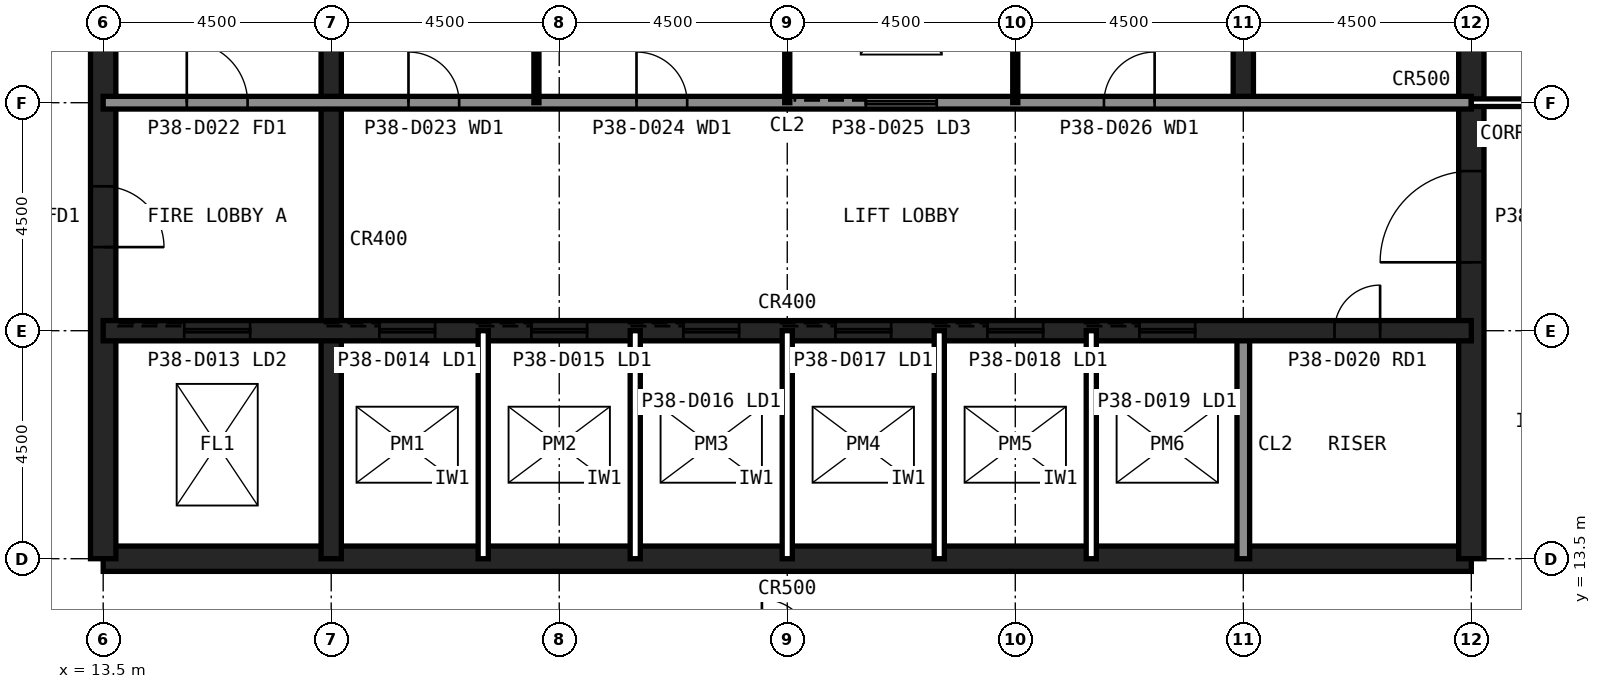
"""IFC4 building model, lengths in metres.
Left out: names, types, materials, properties, quantities, classifications, styles, units other than length and angle.
Written with IfcOpenShell. Run it as: python <this file> out.ifc"""

import sys

from ifc_helpers import new_model, si_unit, direction, frame, frame_2d, origin, place, context, subcontext, project, spatial, rectangle, extrude, element, fill, save


model = new_model("IFC4")
c1 = context("Model", 3, precision=1e-05, world=origin(), true_north=direction((0.0, 1.0)))
c2 = subcontext(c1, "Body", "Model", "MODEL_VIEW")
j1 = project(units=[si_unit("LENGTHUNIT", "METRE"), si_unit("PLANEANGLEUNIT", "RADIAN")], contexts=[c1])
p1 = place(None, origin())
s1 = spatial("IfcSite", under=j1, at=p1, CompositionType="ELEMENT")
p2 = place(p1, origin())
s2 = spatial("IfcBuilding", under=s1, at=p2, CompositionType="ELEMENT")
p3 = place(p2, frame((0.0, 0.0, 159.6)))
s3 = spatial("IfcBuildingStorey", under=s2, at=p3, CompositionType="ELEMENT", Elevation=159.6)
p4 = place(p3, frame((13.5, 13.5, 0.0), z_axis=(0.0, 0.0, 1.0), x_axis=(1.0, 0.0, 0.0)))
e1 = element("IfcWall", 1, at=p4, inside=s3, PredefinedType="SHEAR", context=c2, shape_type="SweptSolid", body=[
    extrude(rectangle(XDim=27.0, YDim=0.5, at=frame_2d((13.5, 0.0))), origin(), (0.0, 0.0, 1.0), 4.0),
])
p5 = place(p3, frame((40.5, 13.5, 0.0), z_axis=(0.0, 0.0, 1.0), x_axis=(0.0, 1.0, 0.0)))
e2 = element("IfcWall", 2, at=p5, inside=s3, PredefinedType="SHEAR", context=c2, shape_type="SweptSolid", body=[
    extrude(rectangle(XDim=27.0, YDim=0.5, at=frame_2d((13.5, 0.0))), origin(), (0.0, 0.0, 1.0), 4.0),
])
p6 = place(p5, frame((5.85, 0.0, 0.0)))
e3 = element("IfcOpeningElement", 3, at=p6, cuts=e2, PredefinedType="OPENING", context=c2, shape_type="SweptSolid", body=[
    extrude(rectangle(XDim=1.8, YDim=2.1, at=frame_2d((0.9, 1.05))), frame((0.0, 0.26, 0.0), z_axis=(0.0, -1.0, 0.0), x_axis=(1.0, 0.0, 0.0)), (0.0, 0.0, 1.0), 0.52),
])
p7 = place(p5, frame((19.65, 0.0, 0.0)))
e4 = element("IfcOpeningElement", 4, at=p7, cuts=e2, PredefinedType="OPENING", context=c2, shape_type="SweptSolid", body=[
    extrude(rectangle(XDim=1.2, YDim=2.1, at=frame_2d((0.6, 1.05))), frame((0.0, 0.26, 0.0), z_axis=(0.0, -1.0, 0.0), x_axis=(1.0, 0.0, 0.0)), (0.0, 0.0, 1.0), 0.52),
])
p8 = place(p3, frame((13.5, 40.5, 0.0), z_axis=(0.0, 0.0, 1.0), x_axis=(0.0, -1.0, 0.0)))
e5 = element("IfcWall", 5, at=p8, inside=s3, PredefinedType="SHEAR", context=c2, shape_type="SweptSolid", body=[
    extrude(rectangle(XDim=27.0, YDim=0.5, at=frame_2d((13.5, 0.0))), origin(), (0.0, 0.0, 1.0), 4.0),
])
p9 = place(p8, frame((19.65, 0.0, 0.0)))
e6 = element("IfcOpeningElement", 6, at=p9, cuts=e5, PredefinedType="OPENING", context=c2, shape_type="SweptSolid", body=[
    extrude(rectangle(XDim=1.2, YDim=2.1, at=frame_2d((0.6, 1.05))), frame((0.0, 0.26, 0.0), z_axis=(0.0, -1.0, 0.0), x_axis=(1.0, 0.0, 0.0)), (0.0, 0.0, 1.0), 0.52),
])
p10 = place(p8, frame((5.85, 0.0, 0.0)))
e7 = element("IfcOpeningElement", 7, at=p10, cuts=e5, PredefinedType="OPENING", context=c2, shape_type="SweptSolid", body=[
    extrude(rectangle(XDim=1.8, YDim=2.1, at=frame_2d((0.9, 1.05))), frame((0.0, 0.26, 0.0), z_axis=(0.0, -1.0, 0.0), x_axis=(1.0, 0.0, 0.0)), (0.0, 0.0, 1.0), 0.52),
])
p11 = place(p3, frame((18.0, 13.5, 0.0), z_axis=(0.0, 0.0, 1.0), x_axis=(0.0, 1.0, 0.0)))
e8 = element("IfcWall", 8, at=p11, inside=s3, PredefinedType="SHEAR", context=c2, shape_type="SweptSolid", body=[
    extrude(rectangle(XDim=18.0, YDim=0.4, at=frame_2d((9.0, 0.0))), origin(), (0.0, 0.0, 1.0), 4.0),
])
p12 = place(p3, frame((36.0, 13.5, 0.0), z_axis=(0.0, 0.0, 1.0), x_axis=(0.0, 1.0, 0.0)))
e9 = element("IfcWall", 9, at=p12, inside=s3, PredefinedType="SOLIDWALL", context=c2, shape_type="SweptSolid", body=[
    extrude(rectangle(XDim=4.5, YDim=0.25, at=frame_2d((2.25, 0.0))), origin(), (0.0, 0.0, 1.0), 3.84),
])
p13 = place(p3, frame((36.0, 22.5, 0.0), z_axis=(0.0, 0.0, 1.0), x_axis=(0.0, 1.0, 0.0)))
e10 = element("IfcWall", 10, at=p13, inside=s3, PredefinedType="SHEAR", context=c2, shape_type="SweptSolid", body=[
    extrude(rectangle(XDim=18.0, YDim=0.4, at=frame_2d((9.0, 0.0))), origin(), (0.0, 0.0, 1.0), 4.0),
])
p14 = place(p3, frame((13.5, 18.0, 0.0), z_axis=(0.0, 0.0, 1.0), x_axis=(1.0, 0.0, 0.0)))
e11 = element("IfcWall", 11, at=p14, inside=s3, PredefinedType="SHEAR", context=c2, shape_type="SweptSolid", body=[
    extrude(rectangle(XDim=27.0, YDim=0.4, at=frame_2d((13.5, 0.0))), origin(), (0.0, 0.0, 1.0), 4.0),
])
p15 = place(p14, frame((24.3, 0.0, 0.0)))
e12 = element("IfcOpeningElement", 12, at=p15, cuts=e11, PredefinedType="OPENING", context=c2, shape_type="SweptSolid", body=[
    extrude(rectangle(XDim=0.9, YDim=2.1, at=frame_2d((0.45, 1.05))), frame((0.0, 0.21, 0.0), z_axis=(0.0, -1.0, 0.0), x_axis=(1.0, 0.0, 0.0)), (0.0, 0.0, 1.0), 0.42),
])
p16 = place(p14, frame((5.45, 0.0, 0.0)))
e13 = element("IfcOpeningElement", 13, at=p16, cuts=e11, PredefinedType="OPENING", context=c2, shape_type="SweptSolid", body=[
    extrude(rectangle(XDim=1.1, YDim=2.1, at=frame_2d((0.55, 1.05))), frame((0.0, 0.21, 0.0), z_axis=(0.0, -1.0, 0.0), x_axis=(1.0, 0.0, 0.0)), (0.0, 0.0, 1.0), 0.42),
])
p17 = place(p14, frame((8.45, 0.0, 0.0)))
e14 = element("IfcOpeningElement", 14, at=p17, cuts=e11, PredefinedType="OPENING", context=c2, shape_type="SweptSolid", body=[
    extrude(rectangle(XDim=1.1, YDim=2.1, at=frame_2d((0.55, 1.05))), frame((0.0, 0.21, 0.0), z_axis=(0.0, -1.0, 0.0), x_axis=(1.0, 0.0, 0.0)), (0.0, 0.0, 1.0), 0.42),
])
p18 = place(p14, frame((11.45, 0.0, 0.0)))
e15 = element("IfcOpeningElement", 15, at=p18, cuts=e11, PredefinedType="OPENING", context=c2, shape_type="SweptSolid", body=[
    extrude(rectangle(XDim=1.1, YDim=2.1, at=frame_2d((0.55, 1.05))), frame((0.0, 0.21, 0.0), z_axis=(0.0, -1.0, 0.0), x_axis=(1.0, 0.0, 0.0)), (0.0, 0.0, 1.0), 0.42),
])
p19 = place(p14, frame((14.45, 0.0, 0.0)))
e16 = element("IfcOpeningElement", 16, at=p19, cuts=e11, PredefinedType="OPENING", context=c2, shape_type="SweptSolid", body=[
    extrude(rectangle(XDim=1.1, YDim=2.1, at=frame_2d((0.55, 1.05))), frame((0.0, 0.21, 0.0), z_axis=(0.0, -1.0, 0.0), x_axis=(1.0, 0.0, 0.0)), (0.0, 0.0, 1.0), 0.42),
])
p20 = place(p14, frame((17.45, 0.0, 0.0)))
e17 = element("IfcOpeningElement", 17, at=p20, cuts=e11, PredefinedType="OPENING", context=c2, shape_type="SweptSolid", body=[
    extrude(rectangle(XDim=1.1, YDim=2.1, at=frame_2d((0.55, 1.05))), frame((0.0, 0.21, 0.0), z_axis=(0.0, -1.0, 0.0), x_axis=(1.0, 0.0, 0.0)), (0.0, 0.0, 1.0), 0.42),
])
p21 = place(p14, frame((20.45, 0.0, 0.0)))
e18 = element("IfcOpeningElement", 18, at=p21, cuts=e11, PredefinedType="OPENING", context=c2, shape_type="SweptSolid", body=[
    extrude(rectangle(XDim=1.1, YDim=2.1, at=frame_2d((0.55, 1.05))), frame((0.0, 0.21, 0.0), z_axis=(0.0, -1.0, 0.0), x_axis=(1.0, 0.0, 0.0)), (0.0, 0.0, 1.0), 0.42),
])
p22 = place(p14, frame((1.6, 0.0, 0.0)))
e19 = element("IfcOpeningElement", 19, at=p22, cuts=e11, PredefinedType="OPENING", context=c2, shape_type="SweptSolid", body=[
    extrude(rectangle(XDim=1.3, YDim=2.2, at=frame_2d((0.65, 1.1))), frame((0.0, 0.21, 0.0), z_axis=(0.0, -1.0, 0.0), x_axis=(1.0, 0.0, 0.0)), (0.0, 0.0, 1.0), 0.42),
])
p23 = place(p3, frame((13.5, 22.5, 0.0), z_axis=(0.0, 0.0, 1.0), x_axis=(1.0, 0.0, 0.0)))
e20 = element("IfcWall", 20, at=p23, inside=s3, PredefinedType="SOLIDWALL", context=c2, shape_type="SweptSolid", body=[
    extrude(rectangle(XDim=27.0, YDim=0.25, at=frame_2d((13.5, 0.0))), origin(), (0.0, 0.0, 1.0), 3.84),
])
p24 = place(p23, frame((1.65, 0.0, 0.0)))
e21 = element("IfcOpeningElement", 21, at=p24, cuts=e20, PredefinedType="OPENING", context=c2, shape_type="SweptSolid", body=[
    extrude(rectangle(XDim=1.2, YDim=2.1, at=frame_2d((0.6, 1.05))), frame((0.0, 0.135, 0.0), z_axis=(0.0, -1.0, 0.0), x_axis=(1.0, 0.0, 0.0)), (0.0, 0.0, 1.0), 0.27),
])
p25 = place(p23, frame((6.025, 0.0, 0.0)))
e22 = element("IfcOpeningElement", 22, at=p25, cuts=e20, PredefinedType="OPENING", context=c2, shape_type="SweptSolid", body=[
    extrude(rectangle(XDim=1.0, YDim=2.1, at=frame_2d((0.5, 1.05))), frame((0.0, 0.135, 0.0), z_axis=(0.0, -1.0, 0.0), x_axis=(1.0, 0.0, 0.0)), (0.0, 0.0, 1.0), 0.27),
])
p26 = place(p23, frame((10.525, 0.0, 0.0)))
e23 = element("IfcOpeningElement", 23, at=p26, cuts=e20, PredefinedType="OPENING", context=c2, shape_type="SweptSolid", body=[
    extrude(rectangle(XDim=1.0, YDim=2.1, at=frame_2d((0.5, 1.05))), frame((0.0, 0.135, 0.0), z_axis=(0.0, -1.0, 0.0), x_axis=(1.0, 0.0, 0.0)), (0.0, 0.0, 1.0), 0.27),
])
p27 = place(p23, frame((19.75, 0.0, 0.0)))
e24 = element("IfcOpeningElement", 24, at=p27, cuts=e20, PredefinedType="OPENING", context=c2, shape_type="SweptSolid", body=[
    extrude(rectangle(XDim=1.0, YDim=2.1, at=frame_2d((0.5, 1.05))), frame((0.0, 0.135, 0.0), z_axis=(0.0, -1.0, 0.0), x_axis=(1.0, 0.0, 0.0)), (0.0, 0.0, 1.0), 0.27),
])
p28 = place(p23, frame((15.05, 0.0, 0.0)))
e25 = element("IfcOpeningElement", 25, at=p28, cuts=e20, PredefinedType="OPENING", context=c2, shape_type="SweptSolid", body=[
    extrude(rectangle(XDim=1.4, YDim=2.4, at=frame_2d((0.7, 1.2))), frame((0.0, 0.135, 0.0), z_axis=(0.0, -1.0, 0.0), x_axis=(1.0, 0.0, 0.0)), (0.0, 0.0, 1.0), 0.27),
])
for number, where, z_axis, x_axis in (
    (26, (21.0, 13.5, 0.0), (0.0, 0.0, 1.0), (0.0, 1.0, 0.0)),
    (27, (24.0, 13.5, 0.0), (0.0, 0.0, 1.0), (0.0, 1.0, 0.0)),
    (28, (27.0, 13.5, 0.0), (0.0, 0.0, 1.0), (0.0, 1.0, 0.0)),
    (29, (30.0, 13.5, 0.0), (0.0, 0.0, 1.0), (0.0, 1.0, 0.0)),
    (30, (33.0, 13.5, 0.0), (0.0, 0.0, 1.0), (0.0, 1.0, 0.0)),
):
    element("IfcWall", number, at=place(p3, frame(where, z_axis=z_axis, x_axis=x_axis)), inside=s3, PredefinedType="PARTITIONING", context=c2, shape_type="SweptSolid", body=[
        extrude(rectangle(XDim=4.5, YDim=0.2, at=frame_2d((2.25, 0.0))), origin(), (0.0, 0.0, 1.0), 3.84),
    ])
for number, where, z_axis, x_axis in (
    (31, (22.05, 22.5, 0.0), (0.0, 0.0, 1.0), (0.0, 1.0, 0.0)),
    (32, (27.0, 22.5, 0.0), (0.0, 0.0, 1.0), (0.0, 1.0, 0.0)),
    (33, (31.5, 22.5, 0.0), (0.0, 0.0, 1.0), (0.0, 1.0, 0.0)),
):
    element("IfcWall", number, at=place(p3, frame(where, z_axis=z_axis, x_axis=x_axis)), inside=s3, PredefinedType="PLUMBINGWALL", context=c2, shape_type="SweptSolid", body=[
        extrude(rectangle(XDim=9.0, YDim=0.1, at=frame_2d((4.5, 0.0))), origin(), (0.0, 0.0, 1.0), 3.84),
    ])
p29 = place(p3, frame((40.5, 22.5, 0.0), z_axis=(0.0, 0.0, 1.0), x_axis=(1.0, 0.0, 0.0)))
e34 = element("IfcWall", 34, at=p29, inside=s3, PredefinedType="PARTITIONING", context=c2, shape_type="SweptSolid", body=[
    extrude(rectangle(XDim=4.5, YDim=0.15, at=frame_2d((2.25, 0.0))), origin(), (0.0, 0.0, 1.0), 2.989),
])
p30 = place(p9, origin())
e35 = element("IfcDoor", 35, at=p30, inside=s3, OperationType="SINGLE_SWING_RIGHT", PredefinedType="DOOR", context=c2, shape_type="SweptSolid", body=[
    extrude(rectangle(XDim=1.2, YDim=2.1, at=frame_2d((0.6, 1.05))), frame((0.0, 0.025, 0.0), z_axis=(0.0, -1.0, 0.0), x_axis=(1.0, 0.0, 0.0)), (0.0, 0.0, 1.0), 0.05),
])
fill(e6, e35)
p31 = place(p6, origin())
e36 = element("IfcDoor", 36, at=p31, inside=s3, OperationType="SINGLE_SWING_LEFT", PredefinedType="DOOR", context=c2, shape_type="SweptSolid", body=[
    extrude(rectangle(XDim=1.8, YDim=2.1, at=frame_2d((0.9, 1.05))), frame((0.0, 0.025, 0.0), z_axis=(0.0, -1.0, 0.0), x_axis=(1.0, 0.0, 0.0)), (0.0, 0.0, 1.0), 0.05),
])
fill(e3, e36)
p32 = place(p24, origin())
e37 = element("IfcDoor", 37, at=p32, inside=s3, OperationType="SINGLE_SWING_LEFT", PredefinedType="DOOR", context=c2, shape_type="SweptSolid", body=[
    extrude(rectangle(XDim=1.2, YDim=2.1, at=frame_2d((0.6, 1.05))), frame((0.0, 0.025, 0.0), z_axis=(0.0, -1.0, 0.0), x_axis=(1.0, 0.0, 0.0)), (0.0, 0.0, 1.0), 0.05),
])
fill(e21, e37)
p33 = place(p25, origin())
e38 = element("IfcDoor", 38, at=p33, inside=s3, OperationType="SINGLE_SWING_LEFT", PredefinedType="DOOR", context=c2, shape_type="SweptSolid", body=[
    extrude(rectangle(XDim=1.0, YDim=2.1, at=frame_2d((0.5, 1.05))), frame((0.0, 0.025, 0.0), z_axis=(0.0, -1.0, 0.0), x_axis=(1.0, 0.0, 0.0)), (0.0, 0.0, 1.0), 0.05),
])
fill(e22, e38)
p34 = place(p26, origin())
e39 = element("IfcDoor", 39, at=p34, inside=s3, OperationType="SINGLE_SWING_LEFT", PredefinedType="DOOR", context=c2, shape_type="SweptSolid", body=[
    extrude(rectangle(XDim=1.0, YDim=2.1, at=frame_2d((0.5, 1.05))), frame((0.0, 0.025, 0.0), z_axis=(0.0, -1.0, 0.0), x_axis=(1.0, 0.0, 0.0)), (0.0, 0.0, 1.0), 0.05),
])
fill(e23, e39)
p35 = place(p27, origin())
e40 = element("IfcDoor", 40, at=p35, inside=s3, OperationType="SINGLE_SWING_RIGHT", PredefinedType="DOOR", context=c2, shape_type="SweptSolid", body=[
    extrude(rectangle(XDim=1.0, YDim=2.1, at=frame_2d((0.5, 1.05))), frame((0.0, 0.025, 0.0), z_axis=(0.0, -1.0, 0.0), x_axis=(1.0, 0.0, 0.0)), (0.0, 0.0, 1.0), 0.05),
])
fill(e24, e40)
p36 = place(p15, origin())
e41 = element("IfcDoor", 41, at=p36, inside=s3, OperationType="SINGLE_SWING_RIGHT", PredefinedType="DOOR", context=c2, shape_type="SweptSolid", body=[
    extrude(rectangle(XDim=0.9, YDim=2.1, at=frame_2d((0.45, 1.05))), frame((0.0, 0.025, 0.0), z_axis=(0.0, -1.0, 0.0), x_axis=(1.0, 0.0, 0.0)), (0.0, 0.0, 1.0), 0.05),
])
fill(e12, e41)
p37 = place(p16, origin())
e42 = element("IfcDoor", 42, at=p37, inside=s3, OperationType="SLIDING_TO_LEFT", PredefinedType="DOOR", context=c2, shape_type="SweptSolid", body=[
    extrude(rectangle(XDim=1.1, YDim=2.1, at=frame_2d((0.55, 1.05))), frame((0.0, 0.025, 0.0), z_axis=(0.0, -1.0, 0.0), x_axis=(1.0, 0.0, 0.0)), (0.0, 0.0, 1.0), 0.05),
])
fill(e13, e42)
p38 = place(p17, origin())
e43 = element("IfcDoor", 43, at=p38, inside=s3, OperationType="SLIDING_TO_LEFT", PredefinedType="DOOR", context=c2, shape_type="SweptSolid", body=[
    extrude(rectangle(XDim=1.1, YDim=2.1, at=frame_2d((0.55, 1.05))), frame((0.0, 0.025, 0.0), z_axis=(0.0, -1.0, 0.0), x_axis=(1.0, 0.0, 0.0)), (0.0, 0.0, 1.0), 0.05),
])
fill(e14, e43)
p39 = place(p18, origin())
e44 = element("IfcDoor", 44, at=p39, inside=s3, OperationType="SLIDING_TO_LEFT", PredefinedType="DOOR", context=c2, shape_type="SweptSolid", body=[
    extrude(rectangle(XDim=1.1, YDim=2.1, at=frame_2d((0.55, 1.05))), frame((0.0, 0.025, 0.0), z_axis=(0.0, -1.0, 0.0), x_axis=(1.0, 0.0, 0.0)), (0.0, 0.0, 1.0), 0.05),
])
fill(e15, e44)
p40 = place(p19, origin())
e45 = element("IfcDoor", 45, at=p40, inside=s3, OperationType="SLIDING_TO_LEFT", PredefinedType="DOOR", context=c2, shape_type="SweptSolid", body=[
    extrude(rectangle(XDim=1.1, YDim=2.1, at=frame_2d((0.55, 1.05))), frame((0.0, 0.025, 0.0), z_axis=(0.0, -1.0, 0.0), x_axis=(1.0, 0.0, 0.0)), (0.0, 0.0, 1.0), 0.05),
])
fill(e16, e45)
p41 = place(p20, origin())
e46 = element("IfcDoor", 46, at=p41, inside=s3, OperationType="SLIDING_TO_LEFT", PredefinedType="DOOR", context=c2, shape_type="SweptSolid", body=[
    extrude(rectangle(XDim=1.1, YDim=2.1, at=frame_2d((0.55, 1.05))), frame((0.0, 0.025, 0.0), z_axis=(0.0, -1.0, 0.0), x_axis=(1.0, 0.0, 0.0)), (0.0, 0.0, 1.0), 0.05),
])
fill(e17, e46)
p42 = place(p21, origin())
e47 = element("IfcDoor", 47, at=p42, inside=s3, OperationType="SLIDING_TO_LEFT", PredefinedType="DOOR", context=c2, shape_type="SweptSolid", body=[
    extrude(rectangle(XDim=1.1, YDim=2.1, at=frame_2d((0.55, 1.05))), frame((0.0, 0.025, 0.0), z_axis=(0.0, -1.0, 0.0), x_axis=(1.0, 0.0, 0.0)), (0.0, 0.0, 1.0), 0.05),
])
fill(e18, e47)
p43 = place(p22, origin())
e48 = element("IfcDoor", 48, at=p43, inside=s3, OperationType="SLIDING_TO_LEFT", PredefinedType="DOOR", context=c2, shape_type="SweptSolid", body=[
    extrude(rectangle(XDim=1.3, YDim=2.2, at=frame_2d((0.65, 1.1))), frame((0.0, 0.025, 0.0), z_axis=(0.0, -1.0, 0.0), x_axis=(1.0, 0.0, 0.0)), (0.0, 0.0, 1.0), 0.05),
])
fill(e19, e48)
p44 = place(p28, origin())
e49 = element("IfcDoor", 49, at=p44, inside=s3, OperationType="SLIDING_TO_LEFT", PredefinedType="DOOR", context=c2, shape_type="SweptSolid", body=[
    extrude(rectangle(XDim=1.4, YDim=2.4, at=frame_2d((0.7, 1.2))), frame((0.0, 0.025, 0.0), z_axis=(0.0, -1.0, 0.0), x_axis=(1.0, 0.0, 0.0)), (0.0, 0.0, 1.0), 0.05),
])
fill(e25, e49)
save(model, sys.argv[1])
